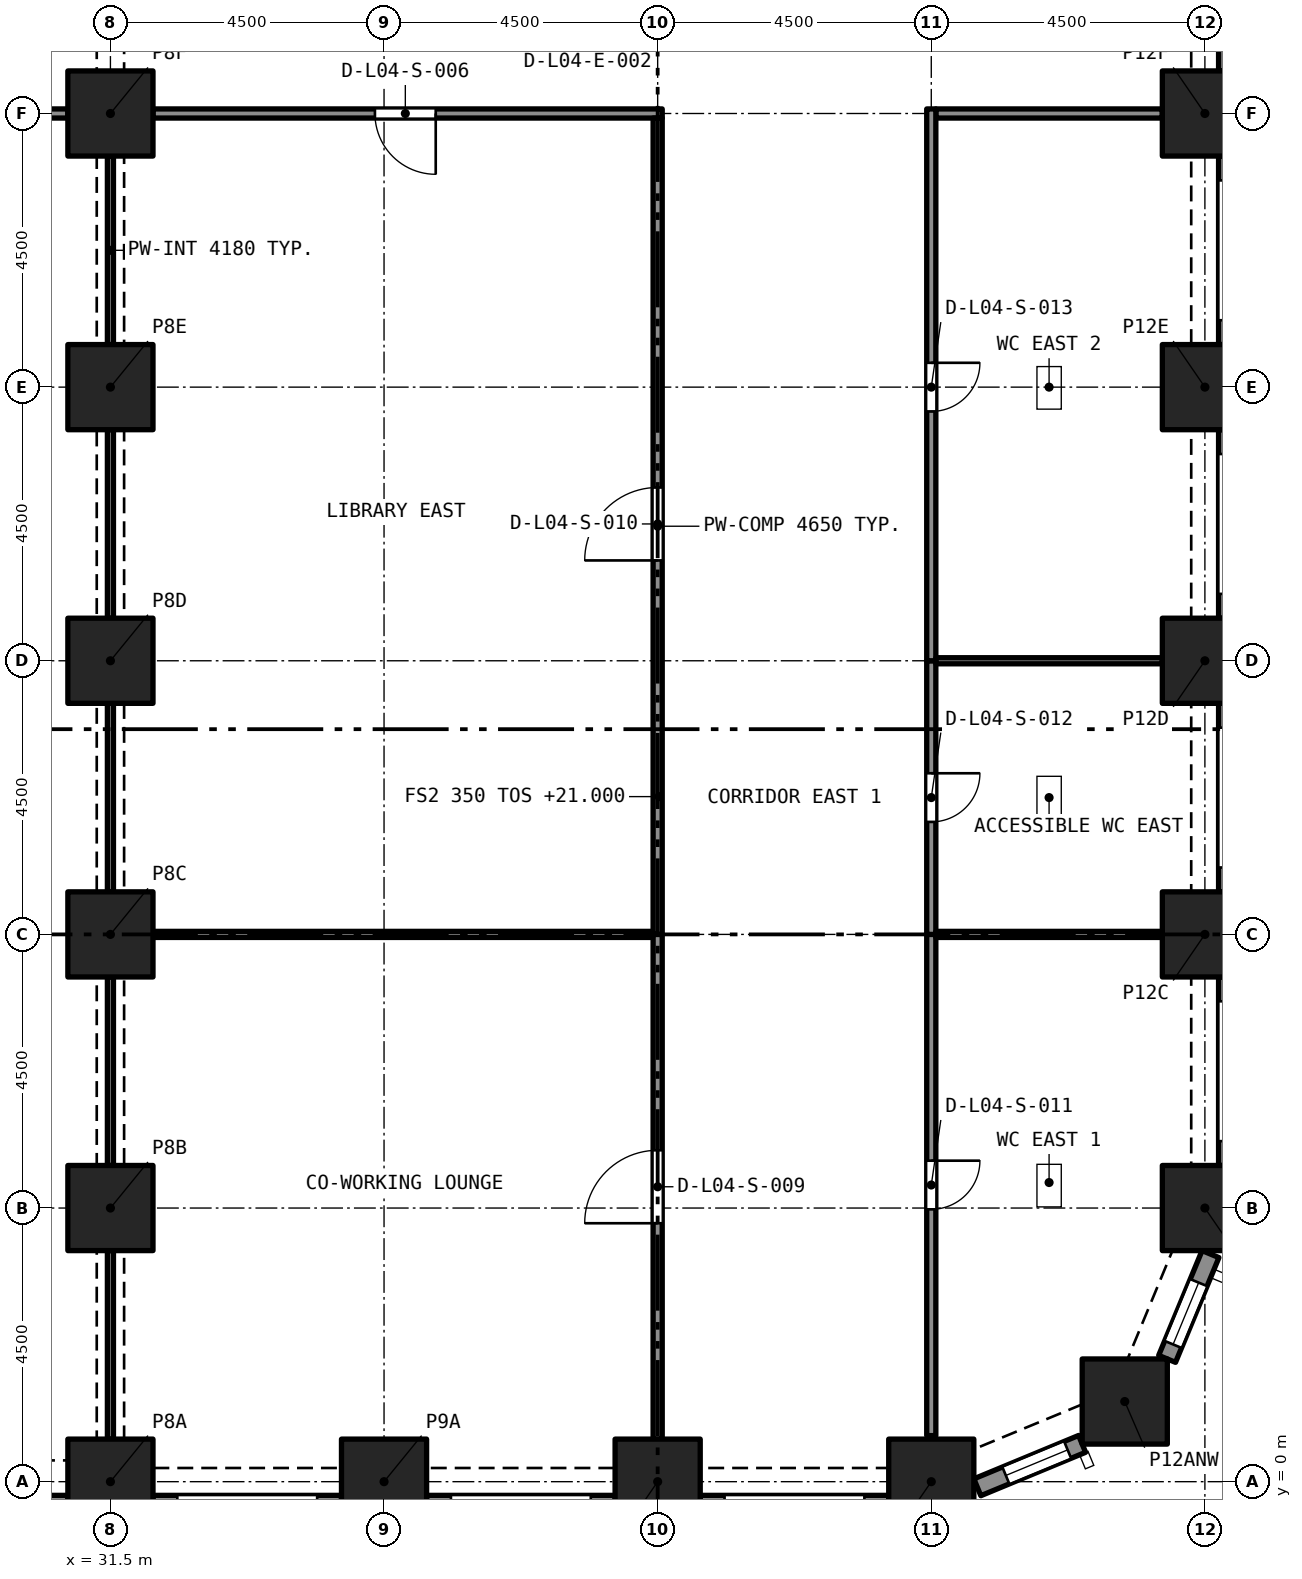
"""IFC4 building model, lengths in metres.
Left out: names, types, materials, properties, quantities, classifications, styles, units other than length and angle.
Written with IfcOpenShell. Run it as: python <this file> out.ifc"""

import sys

from ifc_helpers import new_model, si_unit, direction, frame, frame_2d, origin, origin_2d, place, context, subcontext, project, spatial, rectangle, extrude, element, fill, save


model = new_model("IFC4")
c1 = context("Model", 3, precision=1e-05, world=origin(), true_north=direction((0.0, 1.0)))
c2 = subcontext(c1, "Body", "Model", "MODEL_VIEW")
j1 = project(units=[si_unit("LENGTHUNIT", "METRE"), si_unit("PLANEANGLEUNIT", "RADIAN")], contexts=[c1])
p1 = place(None, origin())
s1 = spatial("IfcSite", under=j1, at=p1, CompositionType="ELEMENT")
p2 = place(p1, origin())
s2 = spatial("IfcBuilding", under=s1, at=p2, CompositionType="ELEMENT")
p3 = place(p2, frame((0.0, 0.0, 21.0)))
s3 = spatial("IfcBuildingStorey", under=s2, at=p3, CompositionType="ELEMENT", Elevation=21.0)
for number, where, z_axis, x_axis in (
    (1, (31.5, 0.0, 0.0), (0.0, 0.0, 1.0), (1.0, 0.0, 0.0)),
    (2, (36.0, 0.0, 0.0), (0.0, 0.0, 1.0), (1.0, 0.0, 0.0)),
    (3, (40.5, 0.0, 0.0), (0.0, 0.0, 1.0), (1.0, 0.0, 0.0)),
    (4, (45.0, 0.0, 0.0), (0.0, 0.0, 1.0), (1.0, 0.0, 0.0)),
    (5, (48.182, 1.318, 0.0), (0.0, 0.0, 1.0), (1.0, 0.0, 0.0)),
    (6, (31.5, 4.5, 0.0), (0.0, 0.0, 1.0), (1.0, 0.0, 0.0)),
    (7, (49.5, 4.5, 0.0), (0.0, 0.0, 1.0), (1.0, 0.0, 0.0)),
    (8, (31.5, 9.0, 0.0), (0.0, 0.0, 1.0), (1.0, 0.0, 0.0)),
    (9, (49.5, 9.0, 0.0), (0.0, 0.0, 1.0), (1.0, 0.0, 0.0)),
    (10, (31.5, 13.5, 0.0), (0.0, 0.0, 1.0), (1.0, 0.0, 0.0)),
    (11, (49.5, 13.5, 0.0), (0.0, 0.0, 1.0), (1.0, 0.0, 0.0)),
    (12, (31.5, 18.0, 0.0), (0.0, 0.0, 1.0), (1.0, 0.0, 0.0)),
    (13, (49.5, 18.0, 0.0), (0.0, 0.0, 1.0), (1.0, 0.0, 0.0)),
    (14, (31.5, 22.5, 0.0), (0.0, 0.0, 1.0), (1.0, 0.0, 0.0)),
    (15, (49.5, 22.5, 0.0), (0.0, 0.0, 1.0), (1.0, 0.0, 0.0)),
):
    element("IfcColumn", number, at=place(p3, frame(where, z_axis=z_axis, x_axis=x_axis)), inside=s3, PredefinedType="COLUMN", context=c2, shape_type="SweptSolid", body=[
        extrude(rectangle(XDim=1.4, YDim=1.4, at=origin_2d()), origin(), (0.0, 0.0, 1.0), 5.0),
    ])
p4 = place(p3, frame((30.8, -0.375, 0.0), z_axis=(0.0, 0.0, 1.0), x_axis=(-1.0, 0.0, 0.0)))
e16 = element("IfcWall", 16, at=p4, inside=s3, PredefinedType="SOLIDWALL", context=c2, shape_type="SweptSolid", body=[
    extrude(rectangle(XDim=3.325, YDim=0.3, at=frame_2d((1.663, 0.0))), origin(), (0.0, 0.0, 1.0), 5.0),
])
p5 = place(p4, frame((0.35, 0.0, 0.45)))
e17 = element("IfcOpeningElement", 17, at=p5, cuts=e16, PredefinedType="OPENING", context=c2, shape_type="SweptSolid", body=[
    extrude(rectangle(XDim=2.4, YDim=3.3, at=frame_2d((1.2, 1.65))), frame((0.0, 0.16, 0.0), z_axis=(0.0, -1.0, 0.0), x_axis=(1.0, 0.0, 0.0)), (0.0, 0.0, 1.0), 0.32),
])
p6 = place(p3, frame((35.3, -0.375, 0.0), z_axis=(0.0, 0.0, 1.0), x_axis=(-1.0, 0.0, 0.0)))
e18 = element("IfcWall", 18, at=p6, inside=s3, PredefinedType="SOLIDWALL", context=c2, shape_type="SweptSolid", body=[
    extrude(rectangle(XDim=3.1, YDim=0.3, at=frame_2d((1.55, 0.0))), origin(), (0.0, 0.0, 1.0), 5.0),
])
p7 = place(p6, frame((0.4, 0.0, 0.45)))
e19 = element("IfcOpeningElement", 19, at=p7, cuts=e18, PredefinedType="OPENING", context=c2, shape_type="SweptSolid", body=[
    extrude(rectangle(XDim=2.3, YDim=3.3, at=frame_2d((1.15, 1.65))), frame((0.0, 0.16, 0.0), z_axis=(0.0, -1.0, 0.0), x_axis=(1.0, 0.0, 0.0)), (0.0, 0.0, 1.0), 0.32),
])
p8 = place(p3, frame((39.8, -0.375, 0.0), z_axis=(0.0, 0.0, 1.0), x_axis=(-1.0, 0.0, 0.0)))
e20 = element("IfcWall", 20, at=p8, inside=s3, PredefinedType="SOLIDWALL", context=c2, shape_type="SweptSolid", body=[
    extrude(rectangle(XDim=3.1, YDim=0.3, at=frame_2d((1.55, 0.0))), origin(), (0.0, 0.0, 1.0), 5.0),
])
p9 = place(p8, frame((0.4, 0.0, 0.45)))
e21 = element("IfcOpeningElement", 21, at=p9, cuts=e20, PredefinedType="OPENING", context=c2, shape_type="SweptSolid", body=[
    extrude(rectangle(XDim=2.3, YDim=3.3, at=frame_2d((1.15, 1.65))), frame((0.0, 0.16, 0.0), z_axis=(0.0, -1.0, 0.0), x_axis=(1.0, 0.0, 0.0)), (0.0, 0.0, 1.0), 0.32),
])
p10 = place(p3, frame((44.3, -0.375, 0.0), z_axis=(0.0, 0.0, 1.0), x_axis=(-1.0, 0.0, 0.0)))
e22 = element("IfcWall", 22, at=p10, inside=s3, PredefinedType="SOLIDWALL", context=c2, shape_type="SweptSolid", body=[
    extrude(rectangle(XDim=3.1, YDim=0.3, at=frame_2d((1.55, 0.0))), origin(), (0.0, 0.0, 1.0), 5.0),
])
p11 = place(p10, frame((0.4, 0.0, 0.45)))
e23 = element("IfcOpeningElement", 23, at=p11, cuts=e22, PredefinedType="OPENING", context=c2, shape_type="SweptSolid", body=[
    extrude(rectangle(XDim=2.3, YDim=3.3, at=frame_2d((1.15, 1.65))), frame((0.0, 0.16, 0.0), z_axis=(0.0, -1.0, 0.0), x_axis=(1.0, 0.0, 0.0)), (0.0, 0.0, 1.0), 0.32),
])
p12 = place(p3, frame((47.48, 0.622, 0.0), z_axis=(0.0, 0.0, 1.0), x_axis=(-0.923903565336, -0.38262540684, 0.0)))
e24 = element("IfcWall", 24, at=p12, inside=s3, PredefinedType="SOLIDWALL", context=c2, shape_type="SweptSolid", body=[
    extrude(rectangle(XDim=1.865, YDim=0.3, at=frame_2d((0.933, 0.0))), origin(), (0.0, 0.0, 1.0), 5.0),
])
p13 = place(p12, frame((0.258, 0.0, 0.45)))
e25 = element("IfcOpeningElement", 25, at=p13, cuts=e24, PredefinedType="OPENING", context=c2, shape_type="SweptSolid", body=[
    extrude(rectangle(XDim=1.1, YDim=3.3, at=frame_2d((0.55, 1.65))), frame((0.0, 0.16, 0.0), z_axis=(0.0, -1.0, 0.0), x_axis=(1.0, 0.0, 0.0)), (0.0, 0.0, 1.0), 0.32),
])
p14 = place(p3, frame((49.592, 3.743, 0.0), z_axis=(0.0, 0.0, 1.0), x_axis=(-0.382737135771, -0.923857286003, 0.0)))
e26 = element("IfcWall", 26, at=p14, inside=s3, PredefinedType="SOLIDWALL", context=c2, shape_type="SweptSolid", body=[
    extrude(rectangle(XDim=1.865, YDim=0.3, at=frame_2d((0.933, 0.0))), origin(), (0.0, 0.0, 1.0), 5.0),
])
p15 = place(p14, frame((0.508, 0.0, 0.45)))
e27 = element("IfcOpeningElement", 27, at=p15, cuts=e26, PredefinedType="OPENING", context=c2, shape_type="SweptSolid", body=[
    extrude(rectangle(XDim=1.1, YDim=3.3, at=frame_2d((0.55, 1.65))), frame((0.0, 0.16, 0.0), z_axis=(0.0, -1.0, 0.0), x_axis=(1.0, 0.0, 0.0)), (0.0, 0.0, 1.0), 0.32),
])
p16 = place(p3, frame((49.875, 8.3, 0.0), z_axis=(0.0, 0.0, 1.0), x_axis=(0.0, -1.0, 0.0)))
e28 = element("IfcWall", 28, at=p16, inside=s3, PredefinedType="SOLIDWALL", context=c2, shape_type="SweptSolid", body=[
    extrude(rectangle(XDim=3.1, YDim=0.3, at=frame_2d((1.55, 0.0))), origin(), (0.0, 0.0, 1.0), 5.0),
])
p17 = place(p16, frame((0.4, 0.0, 0.45)))
e29 = element("IfcOpeningElement", 29, at=p17, cuts=e28, PredefinedType="OPENING", context=c2, shape_type="SweptSolid", body=[
    extrude(rectangle(XDim=2.3, YDim=3.3, at=frame_2d((1.15, 1.65))), frame((0.0, 0.16, 0.0), z_axis=(0.0, -1.0, 0.0), x_axis=(1.0, 0.0, 0.0)), (0.0, 0.0, 1.0), 0.32),
])
p18 = place(p3, frame((49.875, 12.8, 0.0), z_axis=(0.0, 0.0, 1.0), x_axis=(0.0, -1.0, 0.0)))
e30 = element("IfcWall", 30, at=p18, inside=s3, PredefinedType="SOLIDWALL", context=c2, shape_type="SweptSolid", body=[
    extrude(rectangle(XDim=3.1, YDim=0.3, at=frame_2d((1.55, 0.0))), origin(), (0.0, 0.0, 1.0), 5.0),
])
p19 = place(p18, frame((0.4, 0.0, 0.45)))
e31 = element("IfcOpeningElement", 31, at=p19, cuts=e30, PredefinedType="OPENING", context=c2, shape_type="SweptSolid", body=[
    extrude(rectangle(XDim=2.3, YDim=3.3, at=frame_2d((1.15, 1.65))), frame((0.0, 0.16, 0.0), z_axis=(0.0, -1.0, 0.0), x_axis=(1.0, 0.0, 0.0)), (0.0, 0.0, 1.0), 0.32),
])
p20 = place(p3, frame((49.875, 17.3, 0.0), z_axis=(0.0, 0.0, 1.0), x_axis=(0.0, -1.0, 0.0)))
e32 = element("IfcWall", 32, at=p20, inside=s3, PredefinedType="SOLIDWALL", context=c2, shape_type="SweptSolid", body=[
    extrude(rectangle(XDim=3.1, YDim=0.3, at=frame_2d((1.55, 0.0))), origin(), (0.0, 0.0, 1.0), 5.0),
])
p21 = place(p20, frame((0.4, 0.0, 0.45)))
e33 = element("IfcOpeningElement", 33, at=p21, cuts=e32, PredefinedType="OPENING", context=c2, shape_type="SweptSolid", body=[
    extrude(rectangle(XDim=2.3, YDim=3.3, at=frame_2d((1.15, 1.65))), frame((0.0, 0.16, 0.0), z_axis=(0.0, -1.0, 0.0), x_axis=(1.0, 0.0, 0.0)), (0.0, 0.0, 1.0), 0.32),
])
p22 = place(p3, frame((49.875, 21.8, 0.0), z_axis=(0.0, 0.0, 1.0), x_axis=(0.0, -1.0, 0.0)))
e34 = element("IfcWall", 34, at=p22, inside=s3, PredefinedType="SOLIDWALL", context=c2, shape_type="SweptSolid", body=[
    extrude(rectangle(XDim=3.1, YDim=0.3, at=frame_2d((1.55, 0.0))), origin(), (0.0, 0.0, 1.0), 5.0),
])
p23 = place(p22, frame((0.4, 0.0, 0.45)))
e35 = element("IfcOpeningElement", 35, at=p23, cuts=e34, PredefinedType="OPENING", context=c2, shape_type="SweptSolid", body=[
    extrude(rectangle(XDim=2.3, YDim=3.3, at=frame_2d((1.15, 1.65))), frame((0.0, 0.16, 0.0), z_axis=(0.0, -1.0, 0.0), x_axis=(1.0, 0.0, 0.0)), (0.0, 0.0, 1.0), 0.32),
])
p24 = place(p3, frame((49.875, 26.3, 0.0), z_axis=(0.0, 0.0, 1.0), x_axis=(0.0, -1.0, 0.0)))
e36 = element("IfcWall", 36, at=p24, inside=s3, PredefinedType="SOLIDWALL", context=c2, shape_type="SweptSolid", body=[
    extrude(rectangle(XDim=3.1, YDim=0.3, at=frame_2d((1.55, 0.0))), origin(), (0.0, 0.0, 1.0), 5.0),
])
p25 = place(p24, frame((0.4, 0.0, 0.45)))
e37 = element("IfcOpeningElement", 37, at=p25, cuts=e36, PredefinedType="OPENING", context=c2, shape_type="SweptSolid", body=[
    extrude(rectangle(XDim=2.3, YDim=3.3, at=frame_2d((1.15, 1.65))), frame((0.0, 0.16, 0.0), z_axis=(0.0, -1.0, 0.0), x_axis=(1.0, 0.0, 0.0)), (0.0, 0.0, 1.0), 0.32),
])
p26 = place(p3, frame((30.8, 22.5, 0.0), z_axis=(0.0, 0.0, 1.0), x_axis=(-1.0, 0.0, 0.0)))
e38 = element("IfcWall", 38, at=p26, inside=s3, PredefinedType="PARTITIONING", context=c2, shape_type="SweptSolid", body=[
    extrude(rectangle(XDim=12.1, YDim=0.15, at=frame_2d((6.05, 0.0))), origin(), (0.0, 0.0, 1.0), 4.55),
])
p27 = place(p26, frame((5.45, 0.0, 0.0)))
e39 = element("IfcOpeningElement", 39, at=p27, cuts=e38, PredefinedType="OPENING", context=c2, shape_type="SweptSolid", body=[
    extrude(rectangle(XDim=1.2, YDim=2.1, at=frame_2d((0.6, 1.05))), frame((0.0, 0.085, 0.0), z_axis=(0.0, -1.0, 0.0), x_axis=(1.0, 0.0, 0.0)), (0.0, 0.0, 1.0), 0.17),
])
for number, where, z_axis, x_axis in (
    (40, (31.5, 5.2, 0.0), (0.0, 0.0, 1.0), (0.0, 1.0, 0.0)),
    (41, (31.5, 0.7, 0.0), (0.0, 0.0, 1.0), (0.0, 1.0, 0.0)),
    (42, (31.5, 18.7, 0.0), (0.0, 0.0, 1.0), (0.0, 1.0, 0.0)),
    (43, (31.5, 14.2, 0.0), (0.0, 0.0, 1.0), (0.0, 1.0, 0.0)),
    (44, (31.5, 9.7, 0.0), (0.0, 0.0, 1.0), (0.0, 1.0, 0.0)),
):
    element("IfcWall", number, at=place(p3, frame(where, z_axis=z_axis, x_axis=x_axis)), inside=s3, PredefinedType="PARTITIONING", context=c2, shape_type="SweptSolid", body=[
        extrude(rectangle(XDim=3.1, YDim=0.1, at=frame_2d((1.55, 0.0))), origin(), (0.0, 0.0, 1.0), 4.18),
    ])
p28 = place(p3, frame((40.575, 22.5, 0.0), z_axis=(0.0, 0.0, 1.0), x_axis=(-1.0, 0.0, 0.0)))
e45 = element("IfcWall", 45, at=p28, inside=s3, PredefinedType="PARTITIONING", context=c2, shape_type="SweptSolid", body=[
    extrude(rectangle(XDim=8.375, YDim=0.15, at=frame_2d((4.188, 0.0))), origin(), (0.0, 0.0, 1.0), 4.65),
])
p29 = place(p28, frame((3.725, 0.0, 0.0)))
e46 = element("IfcOpeningElement", 46, at=p29, cuts=e45, PredefinedType="OPENING", context=c2, shape_type="SweptSolid", body=[
    extrude(rectangle(XDim=1.0, YDim=2.1, at=frame_2d((0.5, 1.05))), frame((0.0, 0.085, 0.0), z_axis=(0.0, -1.0, 0.0), x_axis=(1.0, 0.0, 0.0)), (0.0, 0.0, 1.0), 0.17),
])
p30 = place(p3, frame((45.075, 22.5, 0.0), z_axis=(0.0, 0.0, 1.0), x_axis=(1.0, 0.0, 0.0)))
e47 = element("IfcWall", 47, at=p30, inside=s3, PredefinedType="PARTITIONING", context=c2, shape_type="SweptSolid", body=[
    extrude(rectangle(XDim=3.725, YDim=0.15, at=frame_2d((1.863, 0.0))), origin(), (0.0, 0.0, 1.0), 4.65),
])
p31 = place(p3, frame((32.2, 9.0, 0.0), z_axis=(0.0, 0.0, 1.0), x_axis=(1.0, 0.0, 0.0)))
e48 = element("IfcWall", 48, at=p31, inside=s3, PredefinedType="PARTITIONING", context=c2, shape_type="SweptSolid", body=[
    extrude(rectangle(XDim=8.225, YDim=0.1, at=frame_2d((4.113, 0.0))), origin(), (0.0, 0.0, 1.0), 4.65),
])
p32 = place(p3, frame((40.5, 0.7, 0.0), z_axis=(0.0, 0.0, 1.0), x_axis=(0.0, 1.0, 0.0)))
e49 = element("IfcWall", 49, at=p32, inside=s3, PredefinedType="PARTITIONING", context=c2, shape_type="SweptSolid", body=[
    extrude(rectangle(XDim=8.3, YDim=0.15, at=frame_2d((4.15, 0.0))), origin(), (0.0, 0.0, 1.0), 4.65),
])
p33 = place(p32, frame((3.55, 0.0, 0.0)))
e50 = element("IfcOpeningElement", 50, at=p33, cuts=e49, PredefinedType="OPENING", context=c2, shape_type="SweptSolid", body=[
    extrude(rectangle(XDim=1.2, YDim=2.1, at=frame_2d((0.6, 1.05))), frame((0.0, 0.085, 0.0), z_axis=(0.0, -1.0, 0.0), x_axis=(1.0, 0.0, 0.0)), (0.0, 0.0, 1.0), 0.17),
])
p34 = place(p3, frame((40.5, 9.0, 0.0), z_axis=(0.0, 0.0, 1.0), x_axis=(0.0, 1.0, 0.0)))
e51 = element("IfcWall", 51, at=p34, inside=s3, PredefinedType="PARTITIONING", context=c2, shape_type="SweptSolid", body=[
    extrude(rectangle(XDim=13.425, YDim=0.15, at=frame_2d((6.712, 0.0))), origin(), (0.0, 0.0, 1.0), 4.65),
])
p35 = place(p34, frame((6.15, 0.0, 0.0)))
e52 = element("IfcOpeningElement", 52, at=p35, cuts=e51, PredefinedType="OPENING", context=c2, shape_type="SweptSolid", body=[
    extrude(rectangle(XDim=1.2, YDim=2.1, at=frame_2d((0.6, 1.05))), frame((0.0, 0.085, 0.0), z_axis=(0.0, -1.0, 0.0), x_axis=(1.0, 0.0, 0.0)), (0.0, 0.0, 1.0), 0.17),
])
p36 = place(p3, frame((45.0, 9.0, 0.0), z_axis=(0.0, 0.0, 1.0), x_axis=(0.0, -1.0, 0.0)))
e53 = element("IfcWall", 53, at=p36, inside=s3, PredefinedType="PARTITIONING", context=c2, shape_type="SweptSolid", body=[
    extrude(rectangle(XDim=8.242, YDim=0.15, at=frame_2d((4.121, 0.0))), origin(), (0.0, 0.0, 1.0), 4.65),
])
p37 = place(p36, frame((3.721, 0.0, 0.0)))
e54 = element("IfcOpeningElement", 54, at=p37, cuts=e53, PredefinedType="OPENING", context=c2, shape_type="SweptSolid", body=[
    extrude(rectangle(XDim=0.8, YDim=2.1, at=frame_2d((0.4, 1.05))), frame((0.0, 0.085, 0.0), z_axis=(0.0, -1.0, 0.0), x_axis=(1.0, 0.0, 0.0)), (0.0, 0.0, 1.0), 0.17),
])
p38 = place(p3, frame((45.0, 13.5, 0.0), z_axis=(0.0, 0.0, 1.0), x_axis=(0.0, -1.0, 0.0)))
e55 = element("IfcWall", 55, at=p38, inside=s3, PredefinedType="PARTITIONING", context=c2, shape_type="SweptSolid", body=[
    extrude(rectangle(XDim=4.5, YDim=0.15, at=frame_2d((2.25, 0.0))), origin(), (0.0, 0.0, 1.0), 4.65),
])
p39 = place(p38, frame((1.85, 0.0, 0.0)))
e56 = element("IfcOpeningElement", 56, at=p39, cuts=e55, PredefinedType="OPENING", context=c2, shape_type="SweptSolid", body=[
    extrude(rectangle(XDim=0.8, YDim=2.1, at=frame_2d((0.4, 1.05))), frame((0.0, 0.085, 0.0), z_axis=(0.0, -1.0, 0.0), x_axis=(1.0, 0.0, 0.0)), (0.0, 0.0, 1.0), 0.17),
])
p40 = place(p3, frame((45.0, 22.575, 0.0), z_axis=(0.0, 0.0, 1.0), x_axis=(0.0, -1.0, 0.0)))
e57 = element("IfcWall", 57, at=p40, inside=s3, PredefinedType="PARTITIONING", context=c2, shape_type="SweptSolid", body=[
    extrude(rectangle(XDim=9.075, YDim=0.15, at=frame_2d((4.538, 0.0))), origin(), (0.0, 0.0, 1.0), 4.65),
])
p41 = place(p40, frame((4.175, 0.0, 0.0)))
e58 = element("IfcOpeningElement", 58, at=p41, cuts=e57, PredefinedType="OPENING", context=c2, shape_type="SweptSolid", body=[
    extrude(rectangle(XDim=0.8, YDim=2.1, at=frame_2d((0.4, 1.05))), frame((0.0, 0.085, 0.0), z_axis=(0.0, -1.0, 0.0), x_axis=(1.0, 0.0, 0.0)), (0.0, 0.0, 1.0), 0.17),
])
for number, where, z_axis, x_axis in (
    (59, (45.075, 9.0, 0.0), (0.0, 0.0, 1.0), (1.0, 0.0, 0.0)),
    (60, (45.075, 13.5, 0.0), (0.0, 0.0, 1.0), (1.0, 0.0, 0.0)),
):
    element("IfcWall", number, at=place(p3, frame(where, z_axis=z_axis, x_axis=x_axis)), inside=s3, PredefinedType="PARTITIONING", context=c2, shape_type="SweptSolid", body=[
        extrude(rectangle(XDim=3.725, YDim=0.1, at=frame_2d((1.863, 0.0))), origin(), (0.0, 0.0, 1.0), 4.65),
    ])
p42 = place(p13, origin())
e61 = element("IfcWindow", 61, at=p42, inside=s3, PartitioningType="SINGLE_PANEL", PredefinedType="WINDOW", context=c2, shape_type="SweptSolid", body=[
    extrude(rectangle(XDim=1.1, YDim=3.3, at=frame_2d((0.55, 1.65))), frame((0.0, 0.03, 0.0), z_axis=(0.0, -1.0, 0.0), x_axis=(1.0, 0.0, 0.0)), (0.0, 0.0, 1.0), 0.06),
])
fill(e25, e61)
p43 = place(p15, origin())
e62 = element("IfcWindow", 62, at=p43, inside=s3, PartitioningType="SINGLE_PANEL", PredefinedType="WINDOW", context=c2, shape_type="SweptSolid", body=[
    extrude(rectangle(XDim=1.1, YDim=3.3, at=frame_2d((0.55, 1.65))), frame((0.0, 0.03, 0.0), z_axis=(0.0, -1.0, 0.0), x_axis=(1.0, 0.0, 0.0)), (0.0, 0.0, 1.0), 0.06),
])
fill(e27, e62)
p44 = place(p29, origin())
e63 = element("IfcDoor", 63, at=p44, inside=s3, OperationType="SINGLE_SWING_RIGHT", PredefinedType="DOOR", context=c2, shape_type="SweptSolid", body=[
    extrude(rectangle(XDim=1.0, YDim=2.1, at=frame_2d((0.5, 1.05))), frame((0.0, 0.025, 0.0), z_axis=(0.0, -1.0, 0.0), x_axis=(1.0, 0.0, 0.0)), (0.0, 0.0, 1.0), 0.05),
])
fill(e46, e63)
p45 = place(p33, origin())
e64 = element("IfcDoor", 64, at=p45, inside=s3, OperationType="SINGLE_SWING_RIGHT", PredefinedType="DOOR", context=c2, shape_type="SweptSolid", body=[
    extrude(rectangle(XDim=1.2, YDim=2.1, at=frame_2d((0.6, 1.05))), frame((0.0, 0.025, 0.0), z_axis=(0.0, -1.0, 0.0), x_axis=(1.0, 0.0, 0.0)), (0.0, 0.0, 1.0), 0.05),
])
fill(e50, e64)
p46 = place(p35, origin())
e65 = element("IfcDoor", 65, at=p46, inside=s3, OperationType="SINGLE_SWING_RIGHT", PredefinedType="DOOR", context=c2, shape_type="SweptSolid", body=[
    extrude(rectangle(XDim=1.2, YDim=2.1, at=frame_2d((0.6, 1.05))), frame((0.0, 0.025, 0.0), z_axis=(0.0, -1.0, 0.0), x_axis=(1.0, 0.0, 0.0)), (0.0, 0.0, 1.0), 0.05),
])
fill(e52, e65)
p47 = place(p37, origin())
e66 = element("IfcDoor", 66, at=p47, inside=s3, OperationType="SINGLE_SWING_RIGHT", PredefinedType="DOOR", context=c2, shape_type="SweptSolid", body=[
    extrude(rectangle(XDim=0.8, YDim=2.1, at=frame_2d((0.4, 1.05))), frame((0.0, 0.025, 0.0), z_axis=(0.0, -1.0, 0.0), x_axis=(1.0, 0.0, 0.0)), (0.0, 0.0, 1.0), 0.05),
])
fill(e54, e66)
p48 = place(p39, origin())
e67 = element("IfcDoor", 67, at=p48, inside=s3, OperationType="SINGLE_SWING_RIGHT", PredefinedType="DOOR", context=c2, shape_type="SweptSolid", body=[
    extrude(rectangle(XDim=0.8, YDim=2.1, at=frame_2d((0.4, 1.05))), frame((0.0, 0.025, 0.0), z_axis=(0.0, -1.0, 0.0), x_axis=(1.0, 0.0, 0.0)), (0.0, 0.0, 1.0), 0.05),
])
fill(e56, e67)
p49 = place(p41, origin())
e68 = element("IfcDoor", 68, at=p49, inside=s3, OperationType="SINGLE_SWING_RIGHT", PredefinedType="DOOR", context=c2, shape_type="SweptSolid", body=[
    extrude(rectangle(XDim=0.8, YDim=2.1, at=frame_2d((0.4, 1.05))), frame((0.0, 0.025, 0.0), z_axis=(0.0, -1.0, 0.0), x_axis=(1.0, 0.0, 0.0)), (0.0, 0.0, 1.0), 0.05),
])
fill(e58, e68)
save(model, sys.argv[1])
